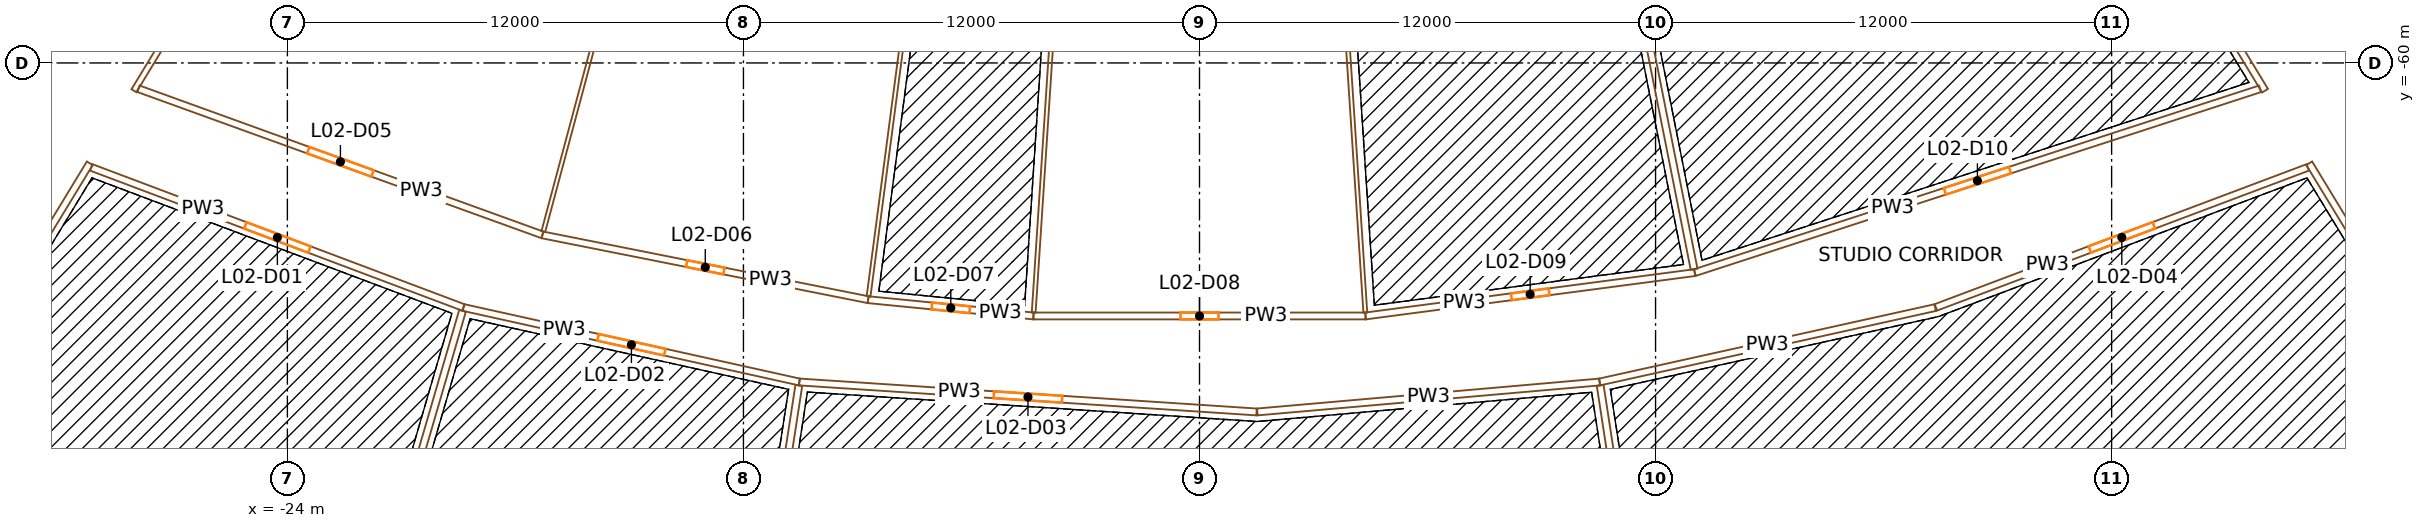
"""IFC4 building model, lengths in metres.
Left out: names, types, materials, properties, quantities, classifications, styles, units other than length and angle.
Written with IfcOpenShell. Run it as: python <this file> out.ifc"""

import sys

from ifc_helpers import new_model, si_unit, direction, frame, frame_2d, origin, place, context, subcontext, project, spatial, rectangle, extrude, element, fill, save


model = new_model("IFC4")
c1 = context("Model", 3, precision=1e-05, world=origin(), true_north=direction((0.0, 1.0)))
c2 = subcontext(c1, "Body", "Model", "MODEL_VIEW")
j1 = project(units=[si_unit("LENGTHUNIT", "METRE"), si_unit("PLANEANGLEUNIT", "RADIAN")], contexts=[c1])
p1 = place(None, origin())
s1 = spatial("IfcSite", under=j1, at=p1, CompositionType="ELEMENT")
p2 = place(p1, origin())
s2 = spatial("IfcBuilding", under=s1, at=p2, CompositionType="ELEMENT")
p3 = place(p2, frame((0.0, 0.0, 18.0)))
s3 = spatial("IfcBuildingStorey", under=s2, at=p3, CompositionType="ELEMENT", Elevation=18.0)
p4 = place(p3, frame((-36.717, -66.337, 0.0), z_axis=(0.0, 0.0, 1.0), x_axis=(0.573577477574, 0.819151315216, 0.0)))
e1 = element("IfcWall", 1, at=p4, inside=s3, PredefinedType="SHEAR", context=c2, shape_type="SweptSolid", body=[
    extrude(rectangle(XDim=14.8, YDim=0.9, at=frame_2d((7.4, 0.0))), origin(), (0.0, 0.0, 1.0), 8.6),
])
p5 = place(p4, frame((6.2, 0.0, 0.0)))
e2 = element("IfcOpeningElement", 2, at=p5, cuts=e1, PredefinedType="OPENING", context=c2, shape_type="SweptSolid", body=[
    extrude(rectangle(XDim=2.4, YDim=2.1, at=frame_2d((1.2, 1.05))), frame((0.0, 0.46, 0.0), z_axis=(0.0, -1.0, 0.0), x_axis=(1.0, 0.0, 0.0)), (0.0, 0.0, 1.0), 0.92),
])
p6 = place(p3, frame((36.717, -66.337, 0.0), z_axis=(0.0, 0.0, 1.0), x_axis=(-0.573577477574, 0.819151315216, 0.0)))
e3 = element("IfcWall", 3, at=p6, inside=s3, PredefinedType="SHEAR", context=c2, shape_type="SweptSolid", body=[
    extrude(rectangle(XDim=14.8, YDim=0.9, at=frame_2d((7.4, 0.0))), origin(), (0.0, 0.0, 1.0), 8.6),
])
p7 = place(p6, frame((6.2, 0.0, 0.0)))
e4 = element("IfcOpeningElement", 4, at=p7, cuts=e3, PredefinedType="OPENING", context=c2, shape_type="SweptSolid", body=[
    extrude(rectangle(XDim=2.4, YDim=2.1, at=frame_2d((1.2, 1.05))), frame((0.0, 0.46, 0.0), z_axis=(0.0, -1.0, 0.0), x_axis=(1.0, 0.0, 0.0)), (0.0, 0.0, 1.0), 0.92),
])
p8 = place(p3, frame((-29.199, -62.639, 0.0), z_axis=(0.0, 0.0, 1.0), x_axis=(-0.519569231187, -0.854428355103, 0.0)))
e5 = element("IfcWall", 5, at=p8, inside=s3, PredefinedType="PARTITIONING", context=c2, shape_type="SweptSolid", body=[
    extrude(rectangle(XDim=9.741, YDim=0.18, at=frame_2d((4.871, 0.0))), origin(), (0.0, 0.0, 1.0), 7.6),
])
p9 = place(p3, frame((-19.366, -66.435, 0.0), z_axis=(0.0, 0.0, 1.0), x_axis=(-0.935901890315, 0.352260772305, 0.0)))
e6 = element("IfcWall", 6, at=p9, inside=s3, PredefinedType="PARTITIONING", context=c2, shape_type="SweptSolid", body=[
    extrude(rectangle(XDim=10.466, YDim=0.18, at=frame_2d((5.233, 0.0))), origin(), (0.0, 0.0, 1.0), 7.6),
])
p10 = place(p9, frame((4.333, 0.0, 0.0)))
e7 = element("IfcOpeningElement", 7, at=p10, cuts=e6, PredefinedType="OPENING", context=c2, shape_type="SweptSolid", body=[
    extrude(rectangle(XDim=1.8, YDim=2.4, at=frame_2d((0.9, 1.2))), frame((0.0, 0.1, 0.0), z_axis=(0.0, -1.0, 0.0), x_axis=(1.0, 0.0, 0.0)), (0.0, 0.0, 1.0), 0.2),
])
p11 = place(p3, frame((-27.92, -60.678, 0.0), z_axis=(0.0, 0.0, 1.0), x_axis=(0.940369024046, -0.340155991589, 0.0)))
e8 = element("IfcWall", 8, at=p11, inside=s3, PredefinedType="PARTITIONING", context=c2, shape_type="SweptSolid", body=[
    extrude(rectangle(XDim=11.305, YDim=0.18, at=frame_2d((5.652, 0.0))), origin(), (0.0, 0.0, 1.0), 7.6),
])
p12 = place(p11, frame((4.752, 0.0, 0.0)))
e9 = element("IfcOpeningElement", 9, at=p12, cuts=e8, PredefinedType="OPENING", context=c2, shape_type="SweptSolid", body=[
    extrude(rectangle(XDim=1.8, YDim=2.1, at=frame_2d((0.9, 1.05))), frame((0.0, 0.1, 0.0), z_axis=(0.0, -1.0, 0.0), x_axis=(1.0, 0.0, 0.0)), (0.0, 0.0, 1.0), 0.2),
])
p13 = place(p3, frame((-23.966, -82.214, 0.0), z_axis=(0.0, 0.0, 1.0), x_axis=(0.279852024748, 0.960043147074, 0.0)))
e10 = element("IfcWall", 10, at=p13, inside=s3, PredefinedType="PARTITIONING", context=c2, shape_type="SweptSolid", body=[
    extrude(rectangle(XDim=16.346, YDim=0.18, at=frame_2d((8.173, 0.0))), origin(), (0.0, 0.0, 1.0), 7.6),
])
p14 = place(p3, frame((-23.174, -52.732, 0.0), z_axis=(0.0, 0.0, 1.0), x_axis=(-0.519584464565, -0.854419091654, 0.0)))
e11 = element("IfcWall", 11, at=p14, inside=s3, PredefinedType="PARTITIONING", context=c2, shape_type="SweptSolid", body=[
    extrude(rectangle(XDim=9.36, YDim=0.15, at=frame_2d((4.68, 0.0))), origin(), (0.0, 0.0, 1.0), 7.6),
])
p15 = place(p3, frame((-10.529, -68.394, 0.0), z_axis=(0.0, 0.0, 1.0), x_axis=(-0.976288493125, 0.216473504595, 0.0)))
e12 = element("IfcWall", 12, at=p15, inside=s3, PredefinedType="PARTITIONING", context=c2, shape_type="SweptSolid", body=[
    extrude(rectangle(XDim=9.052, YDim=0.18, at=frame_2d((4.526, 0.0))), origin(), (0.0, 0.0, 1.0), 7.6),
])
p16 = place(p15, frame((3.626, 0.0, 0.0)))
e13 = element("IfcOpeningElement", 13, at=p16, cuts=e12, PredefinedType="OPENING", context=c2, shape_type="SweptSolid", body=[
    extrude(rectangle(XDim=1.8, YDim=2.4, at=frame_2d((0.9, 1.2))), frame((0.0, 0.1, 0.0), z_axis=(0.0, -1.0, 0.0), x_axis=(1.0, 0.0, 0.0)), (0.0, 0.0, 1.0), 0.2),
])
p17 = place(p3, frame((-17.289, -64.524, 0.0), z_axis=(0.0, 0.0, 1.0), x_axis=(0.980786466832, -0.195084357342, 0.0)))
e14 = element("IfcWall", 14, at=p17, inside=s3, PredefinedType="PARTITIONING", context=c2, shape_type="SweptSolid", body=[
    extrude(rectangle(XDim=8.738, YDim=0.18, at=frame_2d((4.369, 0.0))), origin(), (0.0, 0.0, 1.0), 7.6),
])
p18 = place(p17, frame((3.869, 0.0, 0.0)))
e15 = element("IfcOpeningElement", 15, at=p18, cuts=e14, PredefinedType="OPENING", context=c2, shape_type="SweptSolid", body=[
    extrude(rectangle(XDim=1.0, YDim=2.1, at=frame_2d((0.5, 1.05))), frame((0.0, 0.1, 0.0), z_axis=(0.0, -1.0, 0.0), x_axis=(1.0, 0.0, 0.0)), (0.0, 0.0, 1.0), 0.2),
])
p19 = place(p3, frame((-13.03, -84.639, 0.0), z_axis=(0.0, 0.0, 1.0), x_axis=(0.152152583727, 0.988357016096, 0.0)))
e16 = element("IfcWall", 16, at=p19, inside=s3, PredefinedType="PARTITIONING", context=c2, shape_type="SweptSolid", body=[
    extrude(rectangle(XDim=16.346, YDim=0.18, at=frame_2d((8.173, 0.0))), origin(), (0.0, 0.0, 1.0), 7.6),
])
p20 = place(p3, frame((-12.965, -48.386, 0.0), z_axis=(0.0, 0.0, 1.0), x_axis=(-0.258822009397, -0.965925032004, 0.0)))
e17 = element("IfcWall", 17, at=p20, inside=s3, PredefinedType="PARTITIONING", context=c2, shape_type="SweptSolid", body=[
    extrude(rectangle(XDim=16.617, YDim=0.1, at=frame_2d((8.308, 0.0))), origin(), (0.0, 0.0, 1.0), 7.6),
])
p21 = place(p3, frame((1.502, -69.183, 0.0), z_axis=(0.0, 0.0, 1.0), x_axis=(-0.997858639377, 0.065407459975, 0.0)))
e18 = element("IfcWall", 18, at=p21, inside=s3, PredefinedType="PARTITIONING", context=c2, shape_type="SweptSolid", body=[
    extrude(rectangle(XDim=12.056, YDim=0.18, at=frame_2d((6.028, 0.0))), origin(), (0.0, 0.0, 1.0), 7.6),
])
p22 = place(p21, frame((5.128, 0.0, 0.0)))
e19 = element("IfcOpeningElement", 19, at=p22, cuts=e18, PredefinedType="OPENING", context=c2, shape_type="SweptSolid", body=[
    extrude(rectangle(XDim=1.8, YDim=2.4, at=frame_2d((0.9, 1.2))), frame((0.0, 0.1, 0.0), z_axis=(0.0, -1.0, 0.0), x_axis=(1.0, 0.0, 0.0)), (0.0, 0.0, 1.0), 0.2),
])
p23 = place(p3, frame((-8.719, -66.229, 0.0), z_axis=(0.0, 0.0, 1.0), x_axis=(0.995184826457, -0.098016127192, 0.0)))
e20 = element("IfcWall", 20, at=p23, inside=s3, PredefinedType="PARTITIONING", context=c2, shape_type="SweptSolid", body=[
    extrude(rectangle(XDim=4.371, YDim=0.18, at=frame_2d((2.186, 0.0))), origin(), (0.0, 0.0, 1.0), 7.6),
])
p24 = place(p23, frame((1.686, 0.0, 0.0)))
e21 = element("IfcOpeningElement", 21, at=p24, cuts=e20, PredefinedType="OPENING", context=c2, shape_type="SweptSolid", body=[
    extrude(rectangle(XDim=1.0, YDim=2.1, at=frame_2d((0.5, 1.05))), frame((0.0, 0.1, 0.0), z_axis=(0.0, -1.0, 0.0), x_axis=(1.0, 0.0, 0.0)), (0.0, 0.0, 1.0), 0.2),
])
p25 = place(p3, frame((-6.539, -49.665, 0.0), z_axis=(0.0, 0.0, 1.0), x_axis=(-0.130529385637, -0.991444440947, 0.0)))
e22 = element("IfcWall", 22, at=p25, inside=s3, PredefinedType="PARTITIONING", context=c2, shape_type="SweptSolid", body=[
    extrude(rectangle(XDim=16.616, YDim=0.1, at=frame_2d((8.308, 0.0))), origin(), (0.0, 0.0, 1.0), 7.6),
])
p26 = place(p3, frame((-4.369, -66.657, 0.0), z_axis=(0.0, 0.0, 1.0), x_axis=(1.0, 0.0, 0.0)))
e23 = element("IfcWall", 23, at=p26, inside=s3, PredefinedType="PARTITIONING", context=c2, shape_type="SweptSolid", body=[
    extrude(rectangle(XDim=8.738, YDim=0.18, at=frame_2d((4.369, 0.0))), origin(), (0.0, 0.0, 1.0), 7.6),
])
p27 = place(p26, frame((3.869, 0.0, 0.0)))
e24 = element("IfcOpeningElement", 24, at=p27, cuts=e23, PredefinedType="OPENING", context=c2, shape_type="SweptSolid", body=[
    extrude(rectangle(XDim=1.0, YDim=2.1, at=frame_2d((0.5, 1.05))), frame((0.0, 0.1, 0.0), z_axis=(0.0, -1.0, 0.0), x_axis=(1.0, 0.0, 0.0)), (0.0, 0.0, 1.0), 0.2),
])
p28 = place(p3, frame((-3.283, -50.093, 0.0), z_axis=(0.0, 0.0, 1.0), x_axis=(-0.065405001109, -0.997858800547, 0.0)))
e25 = element("IfcWall", 25, at=p28, inside=s3, PredefinedType="PARTITIONING", context=c2, shape_type="SweptSolid", body=[
    extrude(rectangle(XDim=16.51, YDim=0.1, at=frame_2d((8.255, 0.0))), origin(), (0.0, 0.0, 1.0), 7.6),
])
p29 = place(p3, frame((1.521, -69.183, 0.0), z_axis=(0.0, 0.0, 1.0), x_axis=(0.996192105404, 0.087185372228, 0.0)))
e26 = element("IfcWall", 26, at=p29, inside=s3, PredefinedType="PARTITIONING", context=c2, shape_type="SweptSolid", body=[
    extrude(rectangle(XDim=9.042, YDim=0.18, at=frame_2d((4.521, 0.0))), origin(), (0.0, 0.0, 1.0), 7.6),
])
p30 = place(p3, frame((3.283, -50.093, 0.0), z_axis=(0.0, 0.0, 1.0), x_axis=(0.065405001109, -0.997858800547, 0.0)))
e27 = element("IfcWall", 27, at=p30, inside=s3, PredefinedType="PARTITIONING", context=c2, shape_type="SweptSolid", body=[
    extrude(rectangle(XDim=16.51, YDim=0.1, at=frame_2d((8.255, 0.0))), origin(), (0.0, 0.0, 1.0), 7.6),
])
p31 = place(p3, frame((4.369, -66.657, 0.0), z_axis=(0.0, 0.0, 1.0), x_axis=(0.991443260322, 0.130538352841, 0.0)))
e28 = element("IfcWall", 28, at=p31, inside=s3, PredefinedType="PARTITIONING", context=c2, shape_type="SweptSolid", body=[
    extrude(rectangle(XDim=8.738, YDim=0.18, at=frame_2d((4.369, 0.0))), origin(), (0.0, 0.0, 1.0), 7.6),
])
p32 = place(p31, frame((3.869, 0.0, 0.0)))
e29 = element("IfcOpeningElement", 29, at=p32, cuts=e28, PredefinedType="OPENING", context=c2, shape_type="SweptSolid", body=[
    extrude(rectangle(XDim=1.0, YDim=2.1, at=frame_2d((0.5, 1.05))), frame((0.0, 0.1, 0.0), z_axis=(0.0, -1.0, 0.0), x_axis=(1.0, 0.0, 0.0)), (0.0, 0.0, 1.0), 0.2),
])
p33 = place(p3, frame((9.793, -49.235, 0.0), z_axis=(0.0, 0.0, 1.0), x_axis=(0.195089444663, -0.980785454919, 0.0)))
e30 = element("IfcWall", 30, at=p33, inside=s3, PredefinedType="PARTITIONING", context=c2, shape_type="SweptSolid", body=[
    extrude(rectangle(XDim=16.51, YDim=0.18, at=frame_2d((8.255, 0.0))), origin(), (0.0, 0.0, 1.0), 7.6),
])
p34 = place(p3, frame((10.529, -68.394, 0.0), z_axis=(0.0, 0.0, 1.0), x_axis=(0.976293034631, 0.216453021533, 0.0)))
e31 = element("IfcWall", 31, at=p34, inside=s3, PredefinedType="PARTITIONING", context=c2, shape_type="SweptSolid", body=[
    extrude(rectangle(XDim=9.042, YDim=0.18, at=frame_2d((4.521, 0.0))), origin(), (0.0, 0.0, 1.0), 7.6),
])
p35 = place(p3, frame((13.032, -65.516, 0.0), z_axis=(0.0, 0.0, 1.0), x_axis=(0.950997351979, 0.309199024141, 0.0)))
e32 = element("IfcWall", 32, at=p35, inside=s3, PredefinedType="PARTITIONING", context=c2, shape_type="SweptSolid", body=[
    extrude(rectangle(XDim=15.639, YDim=0.18, at=frame_2d((7.82, 0.0))), origin(), (0.0, 0.0, 1.0), 7.6),
])
p36 = place(p35, frame((6.92, 0.0, 0.0)))
e33 = element("IfcOpeningElement", 33, at=p36, cuts=e32, PredefinedType="OPENING", context=c2, shape_type="SweptSolid", body=[
    extrude(rectangle(XDim=1.8, YDim=2.1, at=frame_2d((0.9, 1.05))), frame((0.0, 0.1, 0.0), z_axis=(0.0, -1.0, 0.0), x_axis=(1.0, 0.0, 0.0)), (0.0, 0.0, 1.0), 0.2),
])
p37 = place(p3, frame((13.03, -84.639, 0.0), z_axis=(0.0, 0.0, 1.0), x_axis=(-0.152152583727, 0.988357016096, 0.0)))
e34 = element("IfcWall", 34, at=p37, inside=s3, PredefinedType="PARTITIONING", context=c2, shape_type="SweptSolid", body=[
    extrude(rectangle(XDim=16.346, YDim=0.18, at=frame_2d((8.173, 0.0))), origin(), (0.0, 0.0, 1.0), 7.6),
])
p38 = place(p3, frame((29.161, -62.748, 0.0), z_axis=(0.0, 0.0, 1.0), x_axis=(-0.935897657387, -0.352272018328, 0.0)))
e35 = element("IfcWall", 35, at=p38, inside=s3, PredefinedType="PARTITIONING", context=c2, shape_type="SweptSolid", body=[
    extrude(rectangle(XDim=10.457, YDim=0.18, at=frame_2d((5.229, 0.0))), origin(), (0.0, 0.0, 1.0), 7.6),
])
p39 = place(p38, frame((4.328, 0.0, 0.0)))
e36 = element("IfcOpeningElement", 36, at=p39, cuts=e35, PredefinedType="OPENING", context=c2, shape_type="SweptSolid", body=[
    extrude(rectangle(XDim=1.8, YDim=2.4, at=frame_2d((0.9, 1.2))), frame((0.0, 0.1, 0.0), z_axis=(0.0, -1.0, 0.0), x_axis=(1.0, 0.0, 0.0)), (0.0, 0.0, 1.0), 0.2),
])
p40 = place(p3, frame((23.174, -52.732, 0.0), z_axis=(0.0, 0.0, 1.0), x_axis=(0.519584464565, -0.854419091654, 0.0)))
e37 = element("IfcWall", 37, at=p40, inside=s3, PredefinedType="PARTITIONING", context=c2, shape_type="SweptSolid", body=[
    extrude(rectangle(XDim=9.36, YDim=0.18, at=frame_2d((4.68, 0.0))), origin(), (0.0, 0.0, 1.0), 7.6),
])
p41 = place(p3, frame((29.199, -62.639, 0.0), z_axis=(0.0, 0.0, 1.0), x_axis=(0.519569231187, -0.854428355103, 0.0)))
e38 = element("IfcWall", 38, at=p41, inside=s3, PredefinedType="PARTITIONING", context=c2, shape_type="SweptSolid", body=[
    extrude(rectangle(XDim=9.741, YDim=0.18, at=frame_2d((4.871, 0.0))), origin(), (0.0, 0.0, 1.0), 7.6),
])
p42 = place(p10, origin())
e39 = element("IfcDoor", 39, at=p42, inside=s3, OperationType="DOUBLE_DOOR_SINGLE_SWING", PredefinedType="DOOR", context=c2, shape_type="SweptSolid", body=[
    extrude(rectangle(XDim=1.8, YDim=2.4, at=frame_2d((0.9, 1.2))), frame((0.0, 0.025, 0.0), z_axis=(0.0, -1.0, 0.0), x_axis=(1.0, 0.0, 0.0)), (0.0, 0.0, 1.0), 0.05),
])
fill(e7, e39)
p43 = place(p16, origin())
e40 = element("IfcDoor", 40, at=p43, inside=s3, OperationType="DOUBLE_DOOR_SINGLE_SWING", PredefinedType="DOOR", context=c2, shape_type="SweptSolid", body=[
    extrude(rectangle(XDim=1.8, YDim=2.4, at=frame_2d((0.9, 1.2))), frame((0.0, 0.025, 0.0), z_axis=(0.0, -1.0, 0.0), x_axis=(1.0, 0.0, 0.0)), (0.0, 0.0, 1.0), 0.05),
])
fill(e13, e40)
p44 = place(p22, origin())
e41 = element("IfcDoor", 41, at=p44, inside=s3, OperationType="DOUBLE_DOOR_SINGLE_SWING", PredefinedType="DOOR", context=c2, shape_type="SweptSolid", body=[
    extrude(rectangle(XDim=1.8, YDim=2.4, at=frame_2d((0.9, 1.2))), frame((0.0, 0.025, 0.0), z_axis=(0.0, -1.0, 0.0), x_axis=(1.0, 0.0, 0.0)), (0.0, 0.0, 1.0), 0.05),
])
fill(e19, e41)
p45 = place(p39, origin())
e42 = element("IfcDoor", 42, at=p45, inside=s3, OperationType="DOUBLE_DOOR_SINGLE_SWING", PredefinedType="DOOR", context=c2, shape_type="SweptSolid", body=[
    extrude(rectangle(XDim=1.8, YDim=2.4, at=frame_2d((0.9, 1.2))), frame((0.0, 0.025, 0.0), z_axis=(0.0, -1.0, 0.0), x_axis=(1.0, 0.0, 0.0)), (0.0, 0.0, 1.0), 0.05),
])
fill(e36, e42)
p46 = place(p12, origin())
e43 = element("IfcDoor", 43, at=p46, inside=s3, OperationType="DOUBLE_DOOR_SINGLE_SWING", PredefinedType="DOOR", context=c2, shape_type="SweptSolid", body=[
    extrude(rectangle(XDim=1.8, YDim=2.1, at=frame_2d((0.9, 1.05))), frame((0.0, 0.025, 0.0), z_axis=(0.0, -1.0, 0.0), x_axis=(1.0, 0.0, 0.0)), (0.0, 0.0, 1.0), 0.05),
])
fill(e9, e43)
p47 = place(p18, origin())
e44 = element("IfcDoor", 44, at=p47, inside=s3, OperationType="SINGLE_SWING_RIGHT", PredefinedType="DOOR", context=c2, shape_type="SweptSolid", body=[
    extrude(rectangle(XDim=1.0, YDim=2.1, at=frame_2d((0.5, 1.05))), frame((0.0, 0.025, 0.0), z_axis=(0.0, -1.0, 0.0), x_axis=(1.0, 0.0, 0.0)), (0.0, 0.0, 1.0), 0.05),
])
fill(e15, e44)
p48 = place(p24, origin())
e45 = element("IfcDoor", 45, at=p48, inside=s3, OperationType="SINGLE_SWING_RIGHT", PredefinedType="DOOR", context=c2, shape_type="SweptSolid", body=[
    extrude(rectangle(XDim=1.0, YDim=2.1, at=frame_2d((0.5, 1.05))), frame((0.0, 0.025, 0.0), z_axis=(0.0, -1.0, 0.0), x_axis=(1.0, 0.0, 0.0)), (0.0, 0.0, 1.0), 0.05),
])
fill(e21, e45)
p49 = place(p27, origin())
e46 = element("IfcDoor", 46, at=p49, inside=s3, OperationType="SINGLE_SWING_RIGHT", PredefinedType="DOOR", context=c2, shape_type="SweptSolid", body=[
    extrude(rectangle(XDim=1.0, YDim=2.1, at=frame_2d((0.5, 1.05))), frame((0.0, 0.025, 0.0), z_axis=(0.0, -1.0, 0.0), x_axis=(1.0, 0.0, 0.0)), (0.0, 0.0, 1.0), 0.05),
])
fill(e24, e46)
p50 = place(p32, origin())
e47 = element("IfcDoor", 47, at=p50, inside=s3, OperationType="SINGLE_SWING_RIGHT", PredefinedType="DOOR", context=c2, shape_type="SweptSolid", body=[
    extrude(rectangle(XDim=1.0, YDim=2.1, at=frame_2d((0.5, 1.05))), frame((0.0, 0.025, 0.0), z_axis=(0.0, -1.0, 0.0), x_axis=(1.0, 0.0, 0.0)), (0.0, 0.0, 1.0), 0.05),
])
fill(e29, e47)
p51 = place(p36, origin())
e48 = element("IfcDoor", 48, at=p51, inside=s3, OperationType="DOUBLE_DOOR_SINGLE_SWING", PredefinedType="DOOR", context=c2, shape_type="SweptSolid", body=[
    extrude(rectangle(XDim=1.8, YDim=2.1, at=frame_2d((0.9, 1.05))), frame((0.0, 0.025, 0.0), z_axis=(0.0, -1.0, 0.0), x_axis=(1.0, 0.0, 0.0)), (0.0, 0.0, 1.0), 0.05),
])
fill(e33, e48)
save(model, sys.argv[1])
